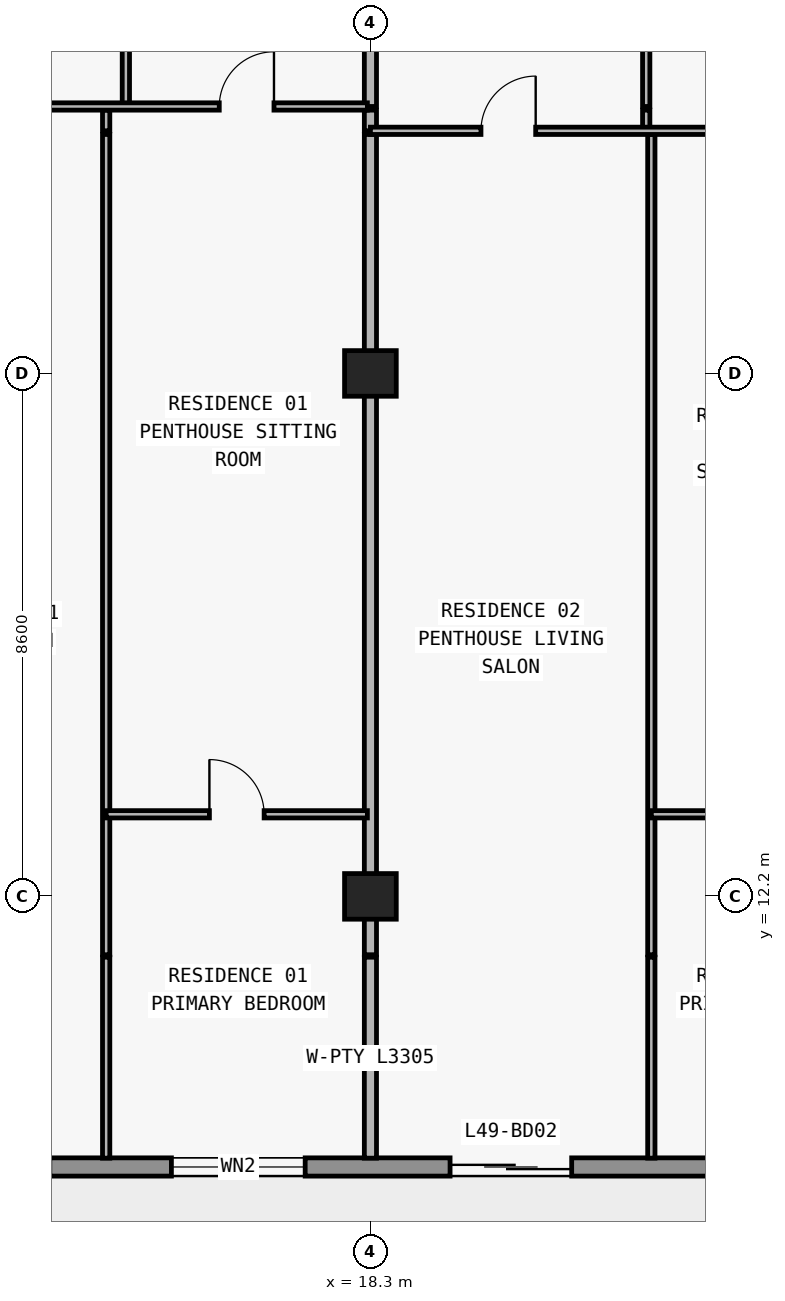
"""IFC4 building model, lengths in metres.
Left out: names, types, materials, properties, quantities, classifications, styles, units other than length and angle.
Written with IfcOpenShell. Run it as: python <this file> out.ifc"""

import sys

from ifc_helpers import new_model, si_unit, direction, frame, frame_2d, origin, origin_2d, place, context, subcontext, project, spatial, rectangle, extrude, element, fill, save


model = new_model("IFC4")
c1 = context("Model", 3, precision=1e-05, world=origin(), true_north=direction((0.0, 1.0)))
c2 = subcontext(c1, "Body", "Model", "MODEL_VIEW")
j1 = project(units=[si_unit("LENGTHUNIT", "METRE"), si_unit("PLANEANGLEUNIT", "RADIAN")], contexts=[c1])
p1 = place(None, origin())
s1 = spatial("IfcSite", under=j1, at=p1, CompositionType="ELEMENT")
p2 = place(p1, origin())
s2 = spatial("IfcBuilding", under=s1, at=p2, CompositionType="ELEMENT")
p3 = place(p2, frame((0.0, 0.0, 177.0)))
s3 = spatial("IfcBuildingStorey", under=s2, at=p3, CompositionType="ELEMENT", Elevation=177.0)
for number, where, z_axis, x_axis in (
    (1, (18.3, 12.2, 0.0), (0.0, 0.0, 1.0), (1.0, 0.0, 0.0)),
    (2, (18.3, 20.8, 0.0), (0.0, 0.0, 1.0), (1.0, 0.0, 0.0)),
):
    element("IfcColumn", number, at=place(p3, frame(where, z_axis=z_axis, x_axis=x_axis)), inside=s3, PredefinedType="COLUMN", context=c2, shape_type="SweptSolid", body=[
        extrude(rectangle(XDim=0.85, YDim=0.75, at=origin_2d()), origin(), (0.0, 0.0, 1.0), 3.05),
    ])
p4 = place(p3, frame((67.7, 7.75, 0.0), z_axis=(0.0, 0.0, 1.0), x_axis=(-1.0, 0.0, 0.0)))
e3 = element("IfcWall", 3, at=p4, inside=s3, PredefinedType="STANDARD", context=c2, shape_type="SweptSolid", body=[
    extrude(rectangle(XDim=57.6, YDim=0.3, at=frame_2d((28.8, 0.0))), origin(), (0.0, 0.0, 1.0), 3.05),
])
p5 = place(p4, frame((54.673, 0.0, 0.0)))
e4 = element("IfcOpeningElement", 4, at=p5, cuts=e3, PredefinedType="OPENING", context=c2, shape_type="SweptSolid", body=[
    extrude(rectangle(XDim=2.0, YDim=2.3, at=frame_2d((1.0, 1.15))), frame((0.0, 0.16, 0.0), z_axis=(0.0, -1.0, 0.0), x_axis=(1.0, 0.0, 0.0)), (0.0, 0.0, 1.0), 0.32),
])
p6 = place(p4, frame((50.473, 0.0, 0.85)))
e5 = element("IfcOpeningElement", 5, at=p6, cuts=e3, PredefinedType="OPENING", context=c2, shape_type="SweptSolid", body=[
    extrude(rectangle(XDim=2.2, YDim=1.55, at=frame_2d((1.1, 0.775))), frame((0.0, 0.16, 0.0), z_axis=(0.0, -1.0, 0.0), x_axis=(1.0, 0.0, 0.0)), (0.0, 0.0, 1.0), 0.32),
])
p7 = place(p4, frame((46.09, 0.0, 0.0)))
e6 = element("IfcOpeningElement", 6, at=p7, cuts=e3, PredefinedType="OPENING", context=c2, shape_type="SweptSolid", body=[
    extrude(rectangle(XDim=2.0, YDim=2.3, at=frame_2d((1.0, 1.15))), frame((0.0, 0.16, 0.0), z_axis=(0.0, -1.0, 0.0), x_axis=(1.0, 0.0, 0.0)), (0.0, 0.0, 1.0), 0.32),
])
p8 = place(p4, frame((41.99, 0.0, 0.85)))
e7 = element("IfcOpeningElement", 7, at=p8, cuts=e3, PredefinedType="OPENING", context=c2, shape_type="SweptSolid", body=[
    extrude(rectangle(XDim=1.8, YDim=1.55, at=frame_2d((0.9, 0.775))), frame((0.0, 0.16, 0.0), z_axis=(0.0, -1.0, 0.0), x_axis=(1.0, 0.0, 0.0)), (0.0, 0.0, 1.0), 0.32),
])
p9 = place(p4, frame((38.09, 0.0, 0.0)))
e8 = element("IfcOpeningElement", 8, at=p9, cuts=e3, PredefinedType="OPENING", context=c2, shape_type="SweptSolid", body=[
    extrude(rectangle(XDim=2.0, YDim=2.3, at=frame_2d((1.0, 1.15))), frame((0.0, 0.16, 0.0), z_axis=(0.0, -1.0, 0.0), x_axis=(1.0, 0.0, 0.0)), (0.0, 0.0, 1.0), 0.32),
])
p10 = place(p4, frame((33.41, 0.0, 0.65)))
e9 = element("IfcOpeningElement", 9, at=p10, cuts=e3, PredefinedType="OPENING", context=c2, shape_type="SweptSolid", body=[
    extrude(rectangle(XDim=2.6, YDim=1.85, at=frame_2d((1.3, 0.925))), frame((0.0, 0.16, 0.0), z_axis=(0.0, -1.0, 0.0), x_axis=(1.0, 0.0, 0.0)), (0.0, 0.0, 1.0), 0.32),
])
p11 = place(p4, frame((27.7, 0.0, 0.85)))
e10 = element("IfcOpeningElement", 10, at=p11, cuts=e3, PredefinedType="OPENING", context=c2, shape_type="SweptSolid", body=[
    extrude(rectangle(XDim=2.2, YDim=1.55, at=frame_2d((1.1, 0.775))), frame((0.0, 0.16, 0.0), z_axis=(0.0, -1.0, 0.0), x_axis=(1.0, 0.0, 0.0)), (0.0, 0.0, 1.0), 0.32),
])
p12 = place(p4, frame((19.7, 0.0, 0.85)))
e11 = element("IfcOpeningElement", 11, at=p12, cuts=e3, PredefinedType="OPENING", context=c2, shape_type="SweptSolid", body=[
    extrude(rectangle(XDim=2.2, YDim=1.55, at=frame_2d((1.1, 0.775))), frame((0.0, 0.16, 0.0), z_axis=(0.0, -1.0, 0.0), x_axis=(1.0, 0.0, 0.0)), (0.0, 0.0, 1.0), 0.32),
])
p13 = place(p4, frame((13.29, 0.0, 0.0)))
e12 = element("IfcOpeningElement", 12, at=p13, cuts=e3, PredefinedType="OPENING", context=c2, shape_type="SweptSolid", body=[
    extrude(rectangle(XDim=2.0, YDim=2.3, at=frame_2d((1.0, 1.15))), frame((0.0, 0.16, 0.0), z_axis=(0.0, -1.0, 0.0), x_axis=(1.0, 0.0, 0.0)), (0.0, 0.0, 1.0), 0.32),
])
p14 = place(p4, frame((9.19, 0.0, 0.85)))
e13 = element("IfcOpeningElement", 13, at=p14, cuts=e3, PredefinedType="OPENING", context=c2, shape_type="SweptSolid", body=[
    extrude(rectangle(XDim=1.8, YDim=1.55, at=frame_2d((0.9, 0.775))), frame((0.0, 0.16, 0.0), z_axis=(0.0, -1.0, 0.0), x_axis=(1.0, 0.0, 0.0)), (0.0, 0.0, 1.0), 0.32),
])
p15 = place(p4, frame((5.273, 0.0, 0.0)))
e14 = element("IfcOpeningElement", 14, at=p15, cuts=e3, PredefinedType="OPENING", context=c2, shape_type="SweptSolid", body=[
    extrude(rectangle(XDim=2.0, YDim=2.3, at=frame_2d((1.0, 1.15))), frame((0.0, 0.16, 0.0), z_axis=(0.0, -1.0, 0.0), x_axis=(1.0, 0.0, 0.0)), (0.0, 0.0, 1.0), 0.32),
])
p16 = place(p4, frame((1.073, 0.0, 0.85)))
e15 = element("IfcOpeningElement", 15, at=p16, cuts=e3, PredefinedType="OPENING", context=c2, shape_type="SweptSolid", body=[
    extrude(rectangle(XDim=2.2, YDim=1.55, at=frame_2d((1.1, 0.775))), frame((0.0, 0.16, 0.0), z_axis=(0.0, -1.0, 0.0), x_axis=(1.0, 0.0, 0.0)), (0.0, 0.0, 1.0), 0.32),
])
p17 = place(p3, frame((13.954, 7.895, 0.0), z_axis=(0.0, 0.0, 1.0), x_axis=(0.0, 1.0, 0.0)))
e16 = element("IfcWall", 16, at=p17, inside=s3, PredefinedType="PARTITIONING", context=c2, shape_type="SweptSolid", body=[
    extrude(rectangle(XDim=3.305, YDim=0.12, at=frame_2d((1.652, 0.0))), origin(), (0.0, 0.0, 1.0), 3.05),
])
p18 = place(p3, frame((13.954, 11.24, 0.0), z_axis=(0.0, 0.0, 1.0), x_axis=(0.0, 1.0, 0.0)))
e17 = element("IfcWall", 17, at=p18, inside=s3, PredefinedType="PARTITIONING", context=c2, shape_type="SweptSolid", body=[
    extrude(rectangle(XDim=13.49, YDim=0.12, at=frame_2d((6.745, 0.0))), origin(), (0.0, 0.0, 1.0), 2.499),
])
p19 = place(p3, frame((13.954, 24.79, 0.0), z_axis=(0.0, 0.0, 1.0), x_axis=(0.0, 1.0, 0.0)))
e18 = element("IfcWall", 18, at=p19, inside=s3, PredefinedType="PARTITIONING", context=c2, shape_type="SweptSolid", body=[
    extrude(rectangle(XDim=0.34, YDim=0.12, at=frame_2d((0.17, 0.0))), origin(), (0.0, 0.0, 1.0), 2.499),
])
p20 = place(p3, frame((14.278, 25.19, 0.0), z_axis=(0.0, 0.0, 1.0), x_axis=(0.0, 1.0, 0.0)))
e19 = element("IfcWall", 19, at=p20, inside=s3, PredefinedType="PARTITIONING", context=c2, shape_type="SweptSolid", body=[
    extrude(rectangle(XDim=4.69, YDim=0.12, at=frame_2d((2.345, 0.0))), origin(), (0.0, 0.0, 1.0), 2.499),
])
p21 = place(p20, frame((1.895, 0.0, 0.0)))
e20 = element("IfcOpeningElement", 20, at=p21, cuts=e19, PredefinedType="OPENING", context=c2, shape_type="SweptSolid", body=[
    extrude(rectangle(XDim=0.9, YDim=2.15, at=frame_2d((0.45, 1.075))), frame((0.0, 0.07, 0.0), z_axis=(0.0, -1.0, 0.0), x_axis=(1.0, 0.0, 0.0)), (0.0, 0.0, 1.0), 0.14),
])
p22 = place(p3, frame((18.3, 7.895, 0.0), z_axis=(0.0, 0.0, 1.0), x_axis=(0.0, 1.0, 0.0)))
e21 = element("IfcWall", 21, at=p22, inside=s3, PredefinedType="PARTITIONING", context=c2, shape_type="SweptSolid", body=[
    extrude(rectangle(XDim=3.305, YDim=0.2, at=frame_2d((1.652, 0.0))), origin(), (0.0, 0.0, 1.0), 3.05),
])
p23 = place(p3, frame((18.3, 11.24, 0.0), z_axis=(0.0, 0.0, 1.0), x_axis=(0.0, 1.0, 0.0)))
e22 = element("IfcWall", 22, at=p23, inside=s3, PredefinedType="PARTITIONING", context=c2, shape_type="SweptSolid", body=[
    extrude(rectangle(XDim=13.49, YDim=0.2, at=frame_2d((6.745, 0.0))), origin(), (0.0, 0.0, 1.0), 2.263),
])
p24 = place(p3, frame((18.3, 24.79, 0.0), z_axis=(0.0, 0.0, 1.0), x_axis=(0.0, 1.0, 0.0)))
e23 = element("IfcWall", 23, at=p24, inside=s3, PredefinedType="PARTITIONING", context=c2, shape_type="SweptSolid", body=[
    extrude(rectangle(XDim=0.34, YDim=0.2, at=frame_2d((0.17, 0.0))), origin(), (0.0, 0.0, 1.0), 2.263),
])
p25 = place(p3, frame((18.3, 25.19, 0.0), z_axis=(0.0, 0.0, 1.0), x_axis=(0.0, 1.0, 0.0)))
e24 = element("IfcWall", 24, at=p25, inside=s3, PredefinedType="PARTITIONING", context=c2, shape_type="SweptSolid", body=[
    extrude(rectangle(XDim=4.69, YDim=0.2, at=frame_2d((2.345, 0.0))), origin(), (0.0, 0.0, 1.0), 2.263),
])
p26 = place(p3, frame((22.836, 24.79, 0.0), z_axis=(0.0, 0.0, 1.0), x_axis=(0.0, 1.0, 0.0)))
e25 = element("IfcWall", 25, at=p26, inside=s3, PredefinedType="PARTITIONING", context=c2, shape_type="SweptSolid", body=[
    extrude(rectangle(XDim=0.34, YDim=0.12, at=frame_2d((0.17, 0.0))), origin(), (0.0, 0.0, 1.0), 3.05),
])
p27 = place(p3, frame((22.836, 25.19, 0.0), z_axis=(0.0, 0.0, 1.0), x_axis=(0.0, 1.0, 0.0)))
e26 = element("IfcWall", 26, at=p27, inside=s3, PredefinedType="PARTITIONING", context=c2, shape_type="SweptSolid", body=[
    extrude(rectangle(XDim=4.69, YDim=0.12, at=frame_2d((2.345, 0.0))), origin(), (0.0, 0.0, 1.0), 3.05),
])
p28 = place(p27, frame((1.895, 0.0, 0.0)))
e27 = element("IfcOpeningElement", 27, at=p28, cuts=e26, PredefinedType="OPENING", context=c2, shape_type="SweptSolid", body=[
    extrude(rectangle(XDim=0.9, YDim=2.15, at=frame_2d((0.45, 1.075))), frame((0.0, 0.07, 0.0), z_axis=(0.0, -1.0, 0.0), x_axis=(1.0, 0.0, 0.0)), (0.0, 0.0, 1.0), 0.14),
])
p29 = place(p3, frame((22.92, 7.895, 0.0), z_axis=(0.0, 0.0, 1.0), x_axis=(0.0, 1.0, 0.0)))
e28 = element("IfcWall", 28, at=p29, inside=s3, PredefinedType="PARTITIONING", context=c2, shape_type="SweptSolid", body=[
    extrude(rectangle(XDim=3.305, YDim=0.12, at=frame_2d((1.652, 0.0))), origin(), (0.0, 0.0, 1.0), 3.05),
])
p30 = place(p3, frame((22.92, 11.24, 0.0), z_axis=(0.0, 0.0, 1.0), x_axis=(0.0, 1.0, 0.0)))
e29 = element("IfcWall", 29, at=p30, inside=s3, PredefinedType="PARTITIONING", context=c2, shape_type="SweptSolid", body=[
    extrude(rectangle(XDim=13.49, YDim=0.12, at=frame_2d((6.745, 0.0))), origin(), (0.0, 0.0, 1.0), 3.05),
])
p31 = place(p3, frame((13.954, 13.55, 0.0), z_axis=(0.0, 0.0, 1.0), x_axis=(1.0, 0.0, 0.0)))
e30 = element("IfcWall", 30, at=p31, inside=s3, PredefinedType="PARTITIONING", context=c2, shape_type="SweptSolid", body=[
    extrude(rectangle(XDim=4.296, YDim=0.12, at=frame_2d((2.148, 0.0))), origin(), (0.0, 0.0, 1.0), 3.05),
])
p32 = place(p31, frame((1.698, 0.0, 0.0)))
e31 = element("IfcOpeningElement", 31, at=p32, cuts=e30, PredefinedType="OPENING", context=c2, shape_type="SweptSolid", body=[
    extrude(rectangle(XDim=0.9, YDim=2.15, at=frame_2d((0.45, 1.075))), frame((0.0, 0.07, 0.0), z_axis=(0.0, -1.0, 0.0), x_axis=(1.0, 0.0, 0.0)), (0.0, 0.0, 1.0), 0.14),
])
p33 = place(p3, frame((22.92, 13.55, 0.0), z_axis=(0.0, 0.0, 1.0), x_axis=(1.0, 0.0, 0.0)))
e32 = element("IfcWall", 32, at=p33, inside=s3, PredefinedType="PARTITIONING", context=c2, shape_type="SweptSolid", body=[
    extrude(rectangle(XDim=3.78, YDim=0.12, at=frame_2d((1.89, 0.0))), origin(), (0.0, 0.0, 1.0), 3.05),
])
p34 = place(p33, frame((1.44, 0.0, 0.0)))
e33 = element("IfcOpeningElement", 33, at=p34, cuts=e32, PredefinedType="OPENING", context=c2, shape_type="SweptSolid", body=[
    extrude(rectangle(XDim=0.9, YDim=2.15, at=frame_2d((0.45, 1.075))), frame((0.0, 0.07, 0.0), z_axis=(0.0, -1.0, 0.0), x_axis=(1.0, 0.0, 0.0)), (0.0, 0.0, 1.0), 0.14),
])
p35 = place(p3, frame((18.3, 24.79, 0.0), z_axis=(0.0, 0.0, 1.0), x_axis=(1.0, 0.0, 0.0)))
e34 = element("IfcWall", 34, at=p35, inside=s3, PredefinedType="PARTITIONING", context=c2, shape_type="SweptSolid", body=[
    extrude(rectangle(XDim=8.18, YDim=0.12, at=frame_2d((4.09, 0.0))), origin(), (0.0, 0.0, 1.0), 3.05),
])
p36 = place(p35, frame((1.818, 0.0, 0.0)))
e35 = element("IfcOpeningElement", 35, at=p36, cuts=e34, PredefinedType="OPENING", context=c2, shape_type="SweptSolid", body=[
    extrude(rectangle(XDim=0.9, YDim=2.15, at=frame_2d((0.45, 1.075))), frame((0.0, 0.07, 0.0), z_axis=(0.0, -1.0, 0.0), x_axis=(1.0, 0.0, 0.0)), (0.0, 0.0, 1.0), 0.14),
])
p37 = place(p35, frame((5.95, 0.0, 0.0)))
e36 = element("IfcOpeningElement", 36, at=p37, cuts=e34, PredefinedType="OPENING", context=c2, shape_type="SweptSolid", body=[
    extrude(rectangle(XDim=0.9, YDim=2.15, at=frame_2d((0.45, 1.075))), frame((0.0, 0.07, 0.0), z_axis=(0.0, -1.0, 0.0), x_axis=(1.0, 0.0, 0.0)), (0.0, 0.0, 1.0), 0.14),
])
p38 = place(p3, frame((10.1, 25.19, 0.0), z_axis=(0.0, 0.0, 1.0), x_axis=(1.0, 0.0, 0.0)))
e37 = element("IfcWall", 37, at=p38, inside=s3, PredefinedType="PARTITIONING", context=c2, shape_type="SweptSolid", body=[
    extrude(rectangle(XDim=8.15, YDim=0.12, at=frame_2d((4.075, 0.0))), origin(), (0.0, 0.0, 1.0), 3.05),
])
p39 = place(p38, frame((1.477, 0.0, 0.0)))
e38 = element("IfcOpeningElement", 38, at=p39, cuts=e37, PredefinedType="OPENING", context=c2, shape_type="SweptSolid", body=[
    extrude(rectangle(XDim=0.9, YDim=2.15, at=frame_2d((0.45, 1.075))), frame((0.0, 0.07, 0.0), z_axis=(0.0, -1.0, 0.0), x_axis=(1.0, 0.0, 0.0)), (0.0, 0.0, 1.0), 0.14),
])
p40 = place(p38, frame((5.714, 0.0, 0.0)))
e39 = element("IfcOpeningElement", 39, at=p40, cuts=e37, PredefinedType="OPENING", context=c2, shape_type="SweptSolid", body=[
    extrude(rectangle(XDim=0.9, YDim=2.15, at=frame_2d((0.45, 1.075))), frame((0.0, 0.07, 0.0), z_axis=(0.0, -1.0, 0.0), x_axis=(1.0, 0.0, 0.0)), (0.0, 0.0, 1.0), 0.14),
])
p41 = place(p6, origin())
e40 = element("IfcWindow", 40, at=p41, inside=s3, PartitioningType="SINGLE_PANEL", PredefinedType="WINDOW", context=c2, shape_type="SweptSolid", body=[
    extrude(rectangle(XDim=2.2, YDim=1.55, at=frame_2d((1.1, 0.775))), frame((0.0, 0.03, 0.0), z_axis=(0.0, -1.0, 0.0), x_axis=(1.0, 0.0, 0.0)), (0.0, 0.0, 1.0), 0.06),
])
fill(e5, e40)
p42 = place(p7, origin())
e41 = element("IfcDoor", 41, at=p42, inside=s3, OperationType="DOUBLE_DOOR_SLIDING", PredefinedType="DOOR", context=c2, shape_type="SweptSolid", body=[
    extrude(rectangle(XDim=2.0, YDim=2.3, at=frame_2d((1.0, 1.15))), frame((0.0, 0.025, 0.0), z_axis=(0.0, -1.0, 0.0), x_axis=(1.0, 0.0, 0.0)), (0.0, 0.0, 1.0), 0.05),
])
fill(e6, e41)
p43 = place(p40, origin())
e42 = element("IfcDoor", 42, at=p43, inside=s3, OperationType="SINGLE_SWING_RIGHT", PredefinedType="DOOR", context=c2, shape_type="SweptSolid", body=[
    extrude(rectangle(XDim=0.9, YDim=2.15, at=frame_2d((0.45, 1.075))), frame((0.0, 0.025, 0.0), z_axis=(0.0, -1.0, 0.0), x_axis=(1.0, 0.0, 0.0)), (0.0, 0.0, 1.0), 0.05),
])
fill(e39, e42)
p44 = place(p32, origin())
e43 = element("IfcDoor", 43, at=p44, inside=s3, OperationType="SINGLE_SWING_LEFT", PredefinedType="DOOR", context=c2, shape_type="SweptSolid", body=[
    extrude(rectangle(XDim=0.9, YDim=2.15, at=frame_2d((0.45, 1.075))), frame((0.0, 0.025, 0.0), z_axis=(0.0, -1.0, 0.0), x_axis=(1.0, 0.0, 0.0)), (0.0, 0.0, 1.0), 0.05),
])
fill(e31, e43)
p45 = place(p36, origin())
e44 = element("IfcDoor", 44, at=p45, inside=s3, OperationType="SINGLE_SWING_RIGHT", PredefinedType="DOOR", context=c2, shape_type="SweptSolid", body=[
    extrude(rectangle(XDim=0.9, YDim=2.15, at=frame_2d((0.45, 1.075))), frame((0.0, 0.025, 0.0), z_axis=(0.0, -1.0, 0.0), x_axis=(1.0, 0.0, 0.0)), (0.0, 0.0, 1.0), 0.05),
])
fill(e35, e44)
save(model, sys.argv[1])
